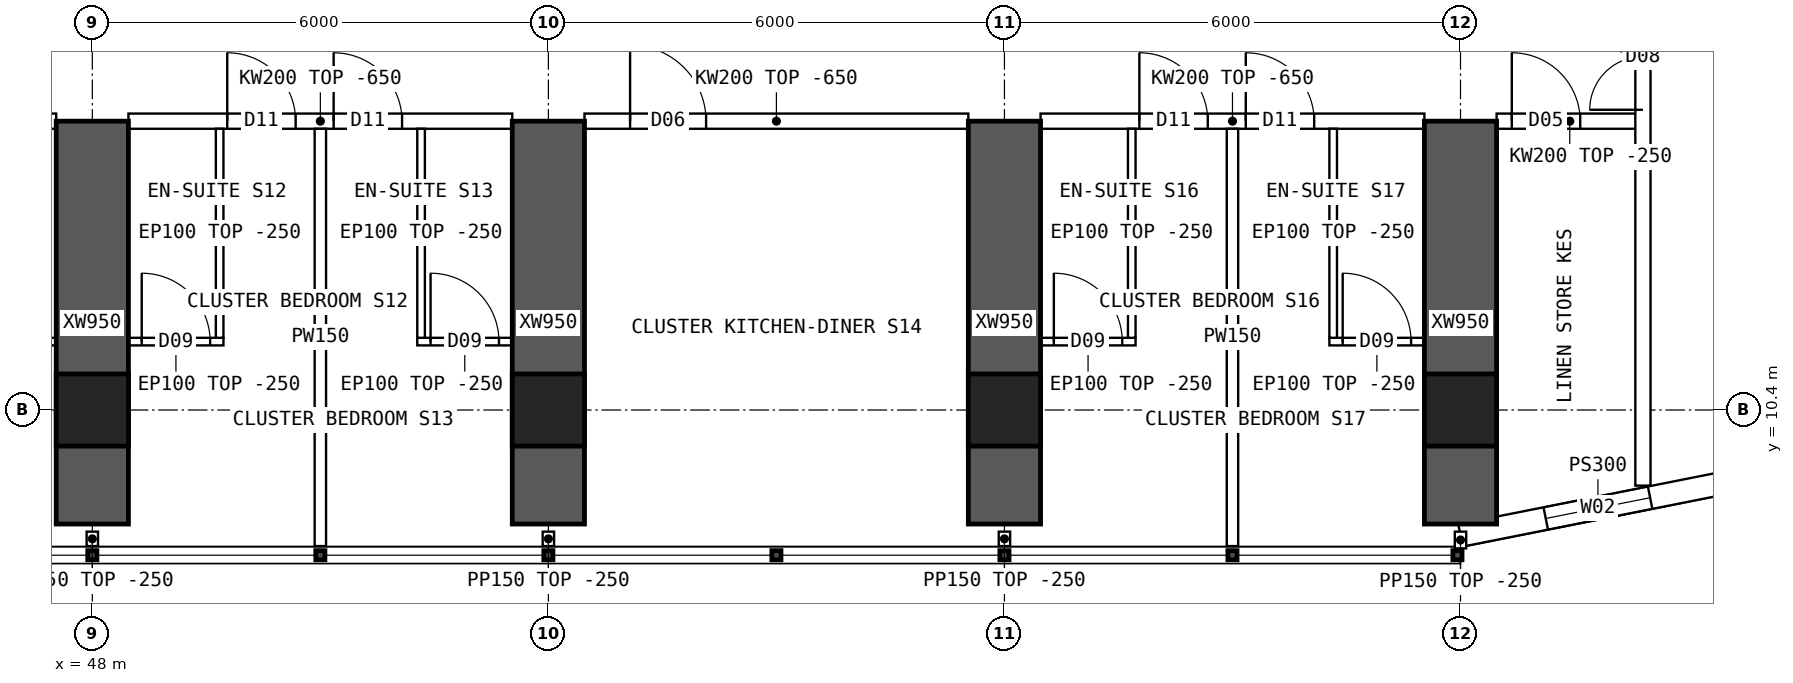
"""IFC4 building model, lengths in metres.
Left out: names, types, materials, properties, quantities, classifications, styles, units other than length and angle.
Written with IfcOpenShell. Run it as: python <this file> out.ifc"""

import sys

from ifc_helpers import new_model, si_unit, direction, frame, frame_2d, origin, origin_2d, place, context, subcontext, project, spatial, polyline, rectangle, hollow_rectangle, outline, extrude, element, fill, save


model = new_model("IFC4")
c1 = context("Model", 3, precision=1e-05, world=origin(), true_north=direction((0.0, 1.0)))
c2 = subcontext(c1, "Body", "Model", "MODEL_VIEW")
j1 = project(units=[si_unit("LENGTHUNIT", "METRE"), si_unit("PLANEANGLEUNIT", "RADIAN")], contexts=[c1])
p1 = place(None, origin())
s1 = spatial("IfcSite", under=j1, at=p1, CompositionType="ELEMENT")
p2 = place(p1, origin())
s2 = spatial("IfcBuilding", under=s1, at=p2, CompositionType="ELEMENT")
p3 = place(p2, frame((0.0, 0.0, 106.9)))
s3 = spatial("IfcBuildingStorey", under=s2, at=p3, CompositionType="ELEMENT", Elevation=106.9)
for number, where, z_axis, x_axis in (
    (1, (48.0, 10.4, 0.0), (0.0, 0.0, 1.0), (1.0, 0.0, 0.0)),
    (2, (54.0, 10.4, 0.0), (0.0, 0.0, 1.0), (1.0, 0.0, 0.0)),
    (3, (60.0, 10.4, 0.0), (0.0, 0.0, 1.0), (1.0, 0.0, 0.0)),
    (4, (66.0, 10.4, 0.0), (0.0, 0.0, 1.0), (1.0, 0.0, 0.0)),
):
    element("IfcColumn", number, at=place(p3, frame(where, z_axis=z_axis, x_axis=x_axis)), inside=s3, PredefinedType="COLUMN", context=c2, shape_type="SweptSolid", body=[
        extrude(hollow_rectangle(XDim=0.95, YDim=0.95, WallThickness=0.095, at=origin_2d()), origin(), (0.0, 0.0, 1.0), 3.75),
    ])
for number, where, z_axis, x_axis in (
    (5, (48.0, 8.9, 0.0), (0.0, 0.0, 1.0), (0.0, 1.0, 0.0)),
    (6, (54.0, 8.9, 0.0), (0.0, 0.0, 1.0), (0.0, 1.0, 0.0)),
    (7, (60.0, 8.9, 0.0), (0.0, 0.0, 1.0), (0.0, 1.0, 0.0)),
    (8, (66.0, 8.9, 0.0), (0.0, 0.0, 1.0), (0.0, 1.0, 0.0)),
):
    element("IfcWall", number, at=place(p3, frame(where, z_axis=z_axis, x_axis=x_axis)), inside=s3, PredefinedType="SHEAR", context=c2, shape_type="SweptSolid", body=[
        extrude(rectangle(XDim=5.3, YDim=0.95, at=frame_2d((2.65, 0.0))), origin(), (0.0, 0.0, 1.0), 3.75),
    ])
p4 = place(p3, frame((66.0, 8.75, 0.0), z_axis=(0.0, 0.0, 1.0), x_axis=(0.980791473772, 0.195059183267, 0.0)))
e9 = element("IfcWall", 9, at=p4, inside=s3, PredefinedType="SOLIDWALL", context=c2, shape_type="SweptSolid", body=[
    extrude(outline(polyline([(-0.03, -0.15), (3.717, -0.15), (3.657, 0.15), (0.03, 0.15), (-0.03, -0.15)])), origin(), (0.0, 0.0, 1.0), 3.5),
])
p5 = place(p4, frame((1.144, 0.0, 0.9)))
e10 = element("IfcOpeningElement", 10, at=p5, cuts=e9, PredefinedType="OPENING", context=c2, shape_type="SweptSolid", body=[
    extrude(rectangle(XDim=1.4, YDim=1.8, at=frame_2d((0.7, 0.9))), frame((0.0, 0.16, 0.0), z_axis=(0.0, -1.0, 0.0), x_axis=(1.0, 0.0, 0.0)), (0.0, 0.0, 1.0), 0.32),
])
p6 = place(p3, frame((42.475, 14.2, 0.0), z_axis=(0.0, 0.0, 1.0), x_axis=(1.0, 0.0, 0.0)))
e11 = element("IfcWall", 11, at=p6, inside=s3, PredefinedType="SOLIDWALL", context=c2, shape_type="SweptSolid", body=[
    extrude(outline(polyline([(0.0, 0.0), (5.05, 0.0), (5.05, 3.1), (0.0, 3.1), (0.0, 0.0)])), frame((0.0, 0.1, 0.0), z_axis=(0.0, -1.0, 0.0), x_axis=(1.0, 0.0, 0.0)), (0.0, 0.0, 1.0), 0.2),
])
p7 = place(p6, frame((1.3, 0.0, 0.0)))
e12 = element("IfcOpeningElement", 12, at=p7, cuts=e11, PredefinedType="OPENING", context=c2, shape_type="SweptSolid", body=[
    extrude(rectangle(XDim=0.9, YDim=2.1, at=frame_2d((0.45, 1.05))), frame((0.0, 0.11, 0.0), z_axis=(0.0, -1.0, 0.0), x_axis=(1.0, 0.0, 0.0)), (0.0, 0.0, 1.0), 0.22),
])
p8 = place(p6, frame((2.7, 0.0, 0.0)))
e13 = element("IfcOpeningElement", 13, at=p8, cuts=e11, PredefinedType="OPENING", context=c2, shape_type="SweptSolid", body=[
    extrude(rectangle(XDim=0.9, YDim=2.1, at=frame_2d((0.45, 1.05))), frame((0.0, 0.11, 0.0), z_axis=(0.0, -1.0, 0.0), x_axis=(1.0, 0.0, 0.0)), (0.0, 0.0, 1.0), 0.22),
])
p9 = place(p3, frame((48.475, 14.2, 0.0), z_axis=(0.0, 0.0, 1.0), x_axis=(1.0, 0.0, 0.0)))
e14 = element("IfcWall", 14, at=p9, inside=s3, PredefinedType="SOLIDWALL", context=c2, shape_type="SweptSolid", body=[
    extrude(outline(polyline([(0.0, 0.0), (5.05, 0.0), (5.05, 3.1), (0.0, 3.1), (0.0, 0.0)])), frame((0.0, 0.1, 0.0), z_axis=(0.0, -1.0, 0.0), x_axis=(1.0, 0.0, 0.0)), (0.0, 0.0, 1.0), 0.2),
])
p10 = place(p9, frame((1.3, 0.0, 0.0)))
e15 = element("IfcOpeningElement", 15, at=p10, cuts=e14, PredefinedType="OPENING", context=c2, shape_type="SweptSolid", body=[
    extrude(rectangle(XDim=0.9, YDim=2.1, at=frame_2d((0.45, 1.05))), frame((0.0, 0.11, 0.0), z_axis=(0.0, -1.0, 0.0), x_axis=(1.0, 0.0, 0.0)), (0.0, 0.0, 1.0), 0.22),
])
p11 = place(p9, frame((2.7, 0.0, 0.0)))
e16 = element("IfcOpeningElement", 16, at=p11, cuts=e14, PredefinedType="OPENING", context=c2, shape_type="SweptSolid", body=[
    extrude(rectangle(XDim=0.9, YDim=2.1, at=frame_2d((0.45, 1.05))), frame((0.0, 0.11, 0.0), z_axis=(0.0, -1.0, 0.0), x_axis=(1.0, 0.0, 0.0)), (0.0, 0.0, 1.0), 0.22),
])
p12 = place(p3, frame((54.475, 14.2, 0.0), z_axis=(0.0, 0.0, 1.0), x_axis=(1.0, 0.0, 0.0)))
e17 = element("IfcWall", 17, at=p12, inside=s3, PredefinedType="SOLIDWALL", context=c2, shape_type="SweptSolid", body=[
    extrude(outline(polyline([(0.0, 0.0), (5.05, 0.0), (5.05, 3.1), (0.0, 3.1), (0.0, 0.0)])), frame((0.0, 0.1, 0.0), z_axis=(0.0, -1.0, 0.0), x_axis=(1.0, 0.0, 0.0)), (0.0, 0.0, 1.0), 0.2),
])
p13 = place(p12, frame((0.6, 0.0, 0.0)))
e18 = element("IfcOpeningElement", 18, at=p13, cuts=e17, PredefinedType="OPENING", context=c2, shape_type="SweptSolid", body=[
    extrude(rectangle(XDim=1.0, YDim=2.1, at=frame_2d((0.5, 1.05))), frame((0.0, 0.11, 0.0), z_axis=(0.0, -1.0, 0.0), x_axis=(1.0, 0.0, 0.0)), (0.0, 0.0, 1.0), 0.22),
])
p14 = place(p3, frame((60.475, 14.2, 0.0), z_axis=(0.0, 0.0, 1.0), x_axis=(1.0, 0.0, 0.0)))
e19 = element("IfcWall", 19, at=p14, inside=s3, PredefinedType="SOLIDWALL", context=c2, shape_type="SweptSolid", body=[
    extrude(outline(polyline([(0.0, 0.0), (5.05, 0.0), (5.05, 3.1), (0.0, 3.1), (0.0, 0.0)])), frame((0.0, 0.1, 0.0), z_axis=(0.0, -1.0, 0.0), x_axis=(1.0, 0.0, 0.0)), (0.0, 0.0, 1.0), 0.2),
])
p15 = place(p14, frame((1.3, 0.0, 0.0)))
e20 = element("IfcOpeningElement", 20, at=p15, cuts=e19, PredefinedType="OPENING", context=c2, shape_type="SweptSolid", body=[
    extrude(rectangle(XDim=0.9, YDim=2.1, at=frame_2d((0.45, 1.05))), frame((0.0, 0.11, 0.0), z_axis=(0.0, -1.0, 0.0), x_axis=(1.0, 0.0, 0.0)), (0.0, 0.0, 1.0), 0.22),
])
p16 = place(p14, frame((2.7, 0.0, 0.0)))
e21 = element("IfcOpeningElement", 21, at=p16, cuts=e19, PredefinedType="OPENING", context=c2, shape_type="SweptSolid", body=[
    extrude(rectangle(XDim=0.9, YDim=2.1, at=frame_2d((0.45, 1.05))), frame((0.0, 0.11, 0.0), z_axis=(0.0, -1.0, 0.0), x_axis=(1.0, 0.0, 0.0)), (0.0, 0.0, 1.0), 0.22),
])
p17 = place(p3, frame((66.475, 14.2, 0.0), z_axis=(0.0, 0.0, 1.0), x_axis=(1.0, 0.0, 0.0)))
e22 = element("IfcWall", 22, at=p17, inside=s3, PredefinedType="SOLIDWALL", context=c2, shape_type="SweptSolid", body=[
    extrude(rectangle(XDim=1.925, YDim=0.2, at=frame_2d((0.962, 0.0))), origin(), (0.0, 0.0, 1.0), 3.5),
])
p18 = place(p17, frame((0.2, 0.0, 0.0)))
e23 = element("IfcOpeningElement", 23, at=p18, cuts=e22, PredefinedType="OPENING", context=c2, shape_type="SweptSolid", body=[
    extrude(rectangle(XDim=0.9, YDim=2.1, at=frame_2d((0.45, 1.05))), frame((0.0, 0.11, 0.0), z_axis=(0.0, -1.0, 0.0), x_axis=(1.0, 0.0, 0.0)), (0.0, 0.0, 1.0), 0.22),
])
p19 = place(p3, frame((47.525, 11.3, 0.0), z_axis=(0.0, 0.0, 1.0), x_axis=(-1.0, 0.0, 0.0)))
e24 = element("IfcWall", 24, at=p19, inside=s3, PredefinedType="PARTITIONING", context=c2, shape_type="SweptSolid", body=[
    extrude(rectangle(XDim=1.25, YDim=0.1, at=frame_2d((0.625, 0.0))), origin(), (0.0, 0.0, 1.0), 3.5),
])
p20 = place(p19, frame((0.175, 0.0, 0.0)))
e25 = element("IfcOpeningElement", 25, at=p20, cuts=e24, PredefinedType="OPENING", context=c2, shape_type="SweptSolid", body=[
    extrude(rectangle(XDim=0.9, YDim=2.1, at=frame_2d((0.45, 1.05))), frame((0.0, 0.06, 0.0), z_axis=(0.0, -1.0, 0.0), x_axis=(1.0, 0.0, 0.0)), (0.0, 0.0, 1.0), 0.12),
])
p21 = place(p3, frame((51.0, 8.61, 0.0), z_axis=(0.0, 0.0, 1.0), x_axis=(0.0, 1.0, 0.0)))
e26 = element("IfcWall", 26, at=p21, inside=s3, PredefinedType="PARTITIONING", context=c2, shape_type="SweptSolid", body=[
    extrude(outline(polyline([(0.0, 0.0), (5.49, 0.0), (5.49, 3.1), (5.442, 3.1), (5.44, 3.5), (1.992, 3.5), (1.99, 3.1), (1.592, 3.1), (1.59, 3.5), (0.0, 3.5), (0.0, 0.0)])), frame((0.0, 0.075, 0.0), z_axis=(0.0, -1.0, 0.0), x_axis=(1.0, 0.0, 0.0)), (0.0, 0.0, 1.0), 0.15),
])
p22 = place(p3, frame((49.725, 11.3, 0.0), z_axis=(0.0, 0.0, 1.0), x_axis=(-1.0, 0.0, 0.0)))
e27 = element("IfcWall", 27, at=p22, inside=s3, PredefinedType="PARTITIONING", context=c2, shape_type="SweptSolid", body=[
    extrude(rectangle(XDim=1.25, YDim=0.1, at=frame_2d((0.625, 0.0))), origin(), (0.0, 0.0, 1.0), 3.5),
])
p23 = place(p22, frame((0.175, 0.0, 0.0)))
e28 = element("IfcOpeningElement", 28, at=p23, cuts=e27, PredefinedType="OPENING", context=c2, shape_type="SweptSolid", body=[
    extrude(rectangle(XDim=0.9, YDim=2.1, at=frame_2d((0.45, 1.05))), frame((0.0, 0.06, 0.0), z_axis=(0.0, -1.0, 0.0), x_axis=(1.0, 0.0, 0.0)), (0.0, 0.0, 1.0), 0.12),
])
p24 = place(p3, frame((49.675, 11.35, 0.0), z_axis=(0.0, 0.0, 1.0), x_axis=(0.0, 1.0, 0.0)))
e29 = element("IfcWall", 29, at=p24, inside=s3, PredefinedType="PARTITIONING", context=c2, shape_type="SweptSolid", body=[
    extrude(outline(polyline([(0.0, 0.0), (2.75, 0.0), (2.75, 3.1), (2.702, 3.1), (2.7, 3.5), (0.0, 3.5), (0.0, 0.0)])), frame((0.0, 0.05, 0.0), z_axis=(0.0, -1.0, 0.0), x_axis=(1.0, 0.0, 0.0)), (0.0, 0.0, 1.0), 0.1),
])
p25 = place(p3, frame((53.525, 11.3, 0.0), z_axis=(0.0, 0.0, 1.0), x_axis=(-1.0, 0.0, 0.0)))
e30 = element("IfcWall", 30, at=p25, inside=s3, PredefinedType="PARTITIONING", context=c2, shape_type="SweptSolid", body=[
    extrude(rectangle(XDim=1.25, YDim=0.1, at=frame_2d((0.625, 0.0))), origin(), (0.0, 0.0, 1.0), 3.5),
])
p26 = place(p25, frame((0.175, 0.0, 0.0)))
e31 = element("IfcOpeningElement", 31, at=p26, cuts=e30, PredefinedType="OPENING", context=c2, shape_type="SweptSolid", body=[
    extrude(rectangle(XDim=0.9, YDim=2.1, at=frame_2d((0.45, 1.05))), frame((0.0, 0.06, 0.0), z_axis=(0.0, -1.0, 0.0), x_axis=(1.0, 0.0, 0.0)), (0.0, 0.0, 1.0), 0.12),
])
p27 = place(p3, frame((52.325, 11.35, 0.0), z_axis=(0.0, 0.0, 1.0), x_axis=(0.0, 1.0, 0.0)))
e32 = element("IfcWall", 32, at=p27, inside=s3, PredefinedType="PARTITIONING", context=c2, shape_type="SweptSolid", body=[
    extrude(outline(polyline([(0.0, 0.0), (2.75, 0.0), (2.75, 3.1), (2.702, 3.1), (2.7, 3.5), (0.0, 3.5), (0.0, 0.0)])), frame((0.0, 0.05, 0.0), z_axis=(0.0, -1.0, 0.0), x_axis=(1.0, 0.0, 0.0)), (0.0, 0.0, 1.0), 0.1),
])
p28 = place(p3, frame((63.0, 8.61, 0.0), z_axis=(0.0, 0.0, 1.0), x_axis=(0.0, 1.0, 0.0)))
e33 = element("IfcWall", 33, at=p28, inside=s3, PredefinedType="PARTITIONING", context=c2, shape_type="SweptSolid", body=[
    extrude(outline(polyline([(0.0, 0.0), (5.49, 0.0), (5.49, 3.1), (5.442, 3.1), (5.44, 3.5), (1.992, 3.5), (1.99, 3.1), (1.592, 3.1), (1.59, 3.5), (0.0, 3.5), (0.0, 0.0)])), frame((0.0, 0.075, 0.0), z_axis=(0.0, -1.0, 0.0), x_axis=(1.0, 0.0, 0.0)), (0.0, 0.0, 1.0), 0.15),
])
p29 = place(p3, frame((61.725, 11.3, 0.0), z_axis=(0.0, 0.0, 1.0), x_axis=(-1.0, 0.0, 0.0)))
e34 = element("IfcWall", 34, at=p29, inside=s3, PredefinedType="PARTITIONING", context=c2, shape_type="SweptSolid", body=[
    extrude(rectangle(XDim=1.25, YDim=0.1, at=frame_2d((0.625, 0.0))), origin(), (0.0, 0.0, 1.0), 3.5),
])
p30 = place(p29, frame((0.175, 0.0, 0.0)))
e35 = element("IfcOpeningElement", 35, at=p30, cuts=e34, PredefinedType="OPENING", context=c2, shape_type="SweptSolid", body=[
    extrude(rectangle(XDim=0.9, YDim=2.1, at=frame_2d((0.45, 1.05))), frame((0.0, 0.06, 0.0), z_axis=(0.0, -1.0, 0.0), x_axis=(1.0, 0.0, 0.0)), (0.0, 0.0, 1.0), 0.12),
])
p31 = place(p3, frame((61.675, 11.35, 0.0), z_axis=(0.0, 0.0, 1.0), x_axis=(0.0, 1.0, 0.0)))
e36 = element("IfcWall", 36, at=p31, inside=s3, PredefinedType="PARTITIONING", context=c2, shape_type="SweptSolid", body=[
    extrude(outline(polyline([(0.0, 0.0), (2.75, 0.0), (2.75, 3.1), (2.702, 3.1), (2.7, 3.5), (0.0, 3.5), (0.0, 0.0)])), frame((0.0, 0.05, 0.0), z_axis=(0.0, -1.0, 0.0), x_axis=(1.0, 0.0, 0.0)), (0.0, 0.0, 1.0), 0.1),
])
p32 = place(p3, frame((65.525, 11.3, 0.0), z_axis=(0.0, 0.0, 1.0), x_axis=(-1.0, 0.0, 0.0)))
e37 = element("IfcWall", 37, at=p32, inside=s3, PredefinedType="PARTITIONING", context=c2, shape_type="SweptSolid", body=[
    extrude(rectangle(XDim=1.25, YDim=0.1, at=frame_2d((0.625, 0.0))), origin(), (0.0, 0.0, 1.0), 3.5),
])
p33 = place(p32, frame((0.175, 0.0, 0.0)))
e38 = element("IfcOpeningElement", 38, at=p33, cuts=e37, PredefinedType="OPENING", context=c2, shape_type="SweptSolid", body=[
    extrude(rectangle(XDim=0.9, YDim=2.1, at=frame_2d((0.45, 1.05))), frame((0.0, 0.06, 0.0), z_axis=(0.0, -1.0, 0.0), x_axis=(1.0, 0.0, 0.0)), (0.0, 0.0, 1.0), 0.12),
])
p34 = place(p3, frame((64.325, 11.35, 0.0), z_axis=(0.0, 0.0, 1.0), x_axis=(0.0, 1.0, 0.0)))
e39 = element("IfcWall", 39, at=p34, inside=s3, PredefinedType="PARTITIONING", context=c2, shape_type="SweptSolid", body=[
    extrude(outline(polyline([(0.0, 0.0), (2.75, 0.0), (2.75, 3.1), (2.702, 3.1), (2.7, 3.5), (0.0, 3.5), (0.0, 0.0)])), frame((0.0, 0.05, 0.0), z_axis=(0.0, -1.0, 0.0), x_axis=(1.0, 0.0, 0.0)), (0.0, 0.0, 1.0), 0.1),
])
p35 = place(p3, frame((68.4, 9.405, 0.0), z_axis=(0.0, 0.0, 1.0), x_axis=(0.0, 1.0, 0.0)))
e40 = element("IfcWall", 40, at=p35, inside=s3, PredefinedType="SOLIDWALL", context=c2, shape_type="SweptSolid", body=[
    extrude(rectangle(XDim=45.189, YDim=0.2, at=frame_2d((22.595, 0.0))), origin(), (0.0, 0.0, 1.0), 3.5),
])
p36 = place(p35, frame((25.595, 0.0, 0.0)))
e41 = element("IfcOpeningElement", 41, at=p36, cuts=e40, PredefinedType="OPENING", context=c2, shape_type="SweptSolid", body=[
    extrude(rectangle(XDim=1.2, YDim=2.1, at=frame_2d((0.6, 1.05))), frame((0.0, 0.11, 0.0), z_axis=(0.0, -1.0, 0.0), x_axis=(1.0, 0.0, 0.0)), (0.0, 0.0, 1.0), 0.22),
])
p37 = place(p35, frame((4.945, 0.0, 0.0)))
e42 = element("IfcOpeningElement", 42, at=p37, cuts=e40, PredefinedType="OPENING", context=c2, shape_type="SweptSolid", body=[
    extrude(rectangle(XDim=1.4, YDim=2.1, at=frame_2d((0.7, 1.05))), frame((0.0, 0.11, 0.0), z_axis=(0.0, -1.0, 0.0), x_axis=(1.0, 0.0, 0.0)), (0.0, 0.0, 1.0), 0.22),
])
p38 = place(p35, frame((38.745, 0.0, 0.0)))
e43 = element("IfcOpeningElement", 43, at=p38, cuts=e40, PredefinedType="OPENING", context=c2, shape_type="SweptSolid", body=[
    extrude(rectangle(XDim=1.4, YDim=2.1, at=frame_2d((0.7, 1.05))), frame((0.0, 0.11, 0.0), z_axis=(0.0, -1.0, 0.0), x_axis=(1.0, 0.0, 0.0)), (0.0, 0.0, 1.0), 0.22),
])
for number, where, z_axis, x_axis in (
    (44, (48.0, 8.8, 0.0), (0.0, 0.0, 1.0), (0.0, -1.0, 0.0)),
    (45, (54.0, 8.8, 0.0), (0.0, 0.0, 1.0), (0.0, -1.0, 0.0)),
    (46, (60.0, 8.8, 0.0), (0.0, 0.0, 1.0), (0.0, -1.0, 0.0)),
):
    element("IfcWall", number, at=place(p3, frame(where, z_axis=z_axis, x_axis=x_axis)), inside=s3, PredefinedType="PARTITIONING", context=c2, shape_type="SweptSolid", body=[
        extrude(rectangle(XDim=0.19, YDim=0.15, at=frame_2d((0.095, 0.0))), origin(), (0.0, 0.0, 1.0), 3.5),
    ])
p39 = place(p3, frame((66.0, 8.8, 0.0), z_axis=(0.0, 0.0, 1.0), x_axis=(0.0, -1.0, 0.0)))
e47 = element("IfcWall", 47, at=p39, inside=s3, PredefinedType="PARTITIONING", context=c2, shape_type="SweptSolid", body=[
    extrude(rectangle(XDim=0.22, YDim=0.15, at=frame_2d((0.11, 0.0))), origin(), (0.0, 0.0, 1.0), 3.5),
])
p40 = place(p5, origin())
e48 = element("IfcWindow", 48, at=p40, inside=s3, PartitioningType="SINGLE_PANEL", PredefinedType="WINDOW", context=c2, shape_type="SweptSolid", body=[
    extrude(rectangle(XDim=1.4, YDim=1.8, at=frame_2d((0.7, 0.9))), frame((0.0, 0.03, 0.0), z_axis=(0.0, -1.0, 0.0), x_axis=(1.0, 0.0, 0.0)), (0.0, 0.0, 1.0), 0.06),
])
fill(e10, e48)
p41 = place(p23, origin())
e49 = element("IfcDoor", 49, at=p41, inside=s3, OperationType="SINGLE_SWING_RIGHT", PredefinedType="DOOR", context=c2, shape_type="SweptSolid", body=[
    extrude(rectangle(XDim=0.9, YDim=2.1, at=frame_2d((0.45, 1.05))), frame((0.0, 0.025, 0.0), z_axis=(0.0, -1.0, 0.0), x_axis=(1.0, 0.0, 0.0)), (0.0, 0.0, 1.0), 0.05),
])
fill(e28, e49)
p42 = place(p10, origin())
e50 = element("IfcDoor", 50, at=p42, inside=s3, OperationType="SINGLE_SWING_LEFT", PredefinedType="DOOR", context=c2, shape_type="SweptSolid", body=[
    extrude(rectangle(XDim=0.9, YDim=2.1, at=frame_2d((0.45, 1.05))), frame((0.0, 0.025, 0.0), z_axis=(0.0, -1.0, 0.0), x_axis=(1.0, 0.0, 0.0)), (0.0, 0.0, 1.0), 0.05),
])
fill(e15, e50)
p43 = place(p26, origin())
e51 = element("IfcDoor", 51, at=p43, inside=s3, OperationType="SINGLE_SWING_RIGHT", PredefinedType="DOOR", context=c2, shape_type="SweptSolid", body=[
    extrude(rectangle(XDim=0.9, YDim=2.1, at=frame_2d((0.45, 1.05))), frame((0.0, 0.025, 0.0), z_axis=(0.0, -1.0, 0.0), x_axis=(1.0, 0.0, 0.0)), (0.0, 0.0, 1.0), 0.05),
])
fill(e31, e51)
p44 = place(p11, origin())
e52 = element("IfcDoor", 52, at=p44, inside=s3, OperationType="SINGLE_SWING_LEFT", PredefinedType="DOOR", context=c2, shape_type="SweptSolid", body=[
    extrude(rectangle(XDim=0.9, YDim=2.1, at=frame_2d((0.45, 1.05))), frame((0.0, 0.025, 0.0), z_axis=(0.0, -1.0, 0.0), x_axis=(1.0, 0.0, 0.0)), (0.0, 0.0, 1.0), 0.05),
])
fill(e16, e52)
p45 = place(p13, origin())
e53 = element("IfcDoor", 53, at=p45, inside=s3, OperationType="SINGLE_SWING_LEFT", PredefinedType="DOOR", context=c2, shape_type="SweptSolid", body=[
    extrude(rectangle(XDim=1.0, YDim=2.1, at=frame_2d((0.5, 1.05))), frame((0.0, 0.025, 0.0), z_axis=(0.0, -1.0, 0.0), x_axis=(1.0, 0.0, 0.0)), (0.0, 0.0, 1.0), 0.05),
])
fill(e18, e53)
p46 = place(p30, origin())
e54 = element("IfcDoor", 54, at=p46, inside=s3, OperationType="SINGLE_SWING_RIGHT", PredefinedType="DOOR", context=c2, shape_type="SweptSolid", body=[
    extrude(rectangle(XDim=0.9, YDim=2.1, at=frame_2d((0.45, 1.05))), frame((0.0, 0.025, 0.0), z_axis=(0.0, -1.0, 0.0), x_axis=(1.0, 0.0, 0.0)), (0.0, 0.0, 1.0), 0.05),
])
fill(e35, e54)
p47 = place(p15, origin())
e55 = element("IfcDoor", 55, at=p47, inside=s3, OperationType="SINGLE_SWING_LEFT", PredefinedType="DOOR", context=c2, shape_type="SweptSolid", body=[
    extrude(rectangle(XDim=0.9, YDim=2.1, at=frame_2d((0.45, 1.05))), frame((0.0, 0.025, 0.0), z_axis=(0.0, -1.0, 0.0), x_axis=(1.0, 0.0, 0.0)), (0.0, 0.0, 1.0), 0.05),
])
fill(e20, e55)
p48 = place(p33, origin())
e56 = element("IfcDoor", 56, at=p48, inside=s3, OperationType="SINGLE_SWING_RIGHT", PredefinedType="DOOR", context=c2, shape_type="SweptSolid", body=[
    extrude(rectangle(XDim=0.9, YDim=2.1, at=frame_2d((0.45, 1.05))), frame((0.0, 0.025, 0.0), z_axis=(0.0, -1.0, 0.0), x_axis=(1.0, 0.0, 0.0)), (0.0, 0.0, 1.0), 0.05),
])
fill(e38, e56)
p49 = place(p16, origin())
e57 = element("IfcDoor", 57, at=p49, inside=s3, OperationType="SINGLE_SWING_LEFT", PredefinedType="DOOR", context=c2, shape_type="SweptSolid", body=[
    extrude(rectangle(XDim=0.9, YDim=2.1, at=frame_2d((0.45, 1.05))), frame((0.0, 0.025, 0.0), z_axis=(0.0, -1.0, 0.0), x_axis=(1.0, 0.0, 0.0)), (0.0, 0.0, 1.0), 0.05),
])
fill(e21, e57)
p50 = place(p37, origin())
e58 = element("IfcDoor", 58, at=p50, inside=s3, OperationType="DOUBLE_DOOR_SINGLE_SWING", PredefinedType="DOOR", context=c2, shape_type="SweptSolid", body=[
    extrude(rectangle(XDim=1.4, YDim=2.1, at=frame_2d((0.7, 1.05))), frame((0.0, 0.025, 0.0), z_axis=(0.0, -1.0, 0.0), x_axis=(1.0, 0.0, 0.0)), (0.0, 0.0, 1.0), 0.05),
])
fill(e42, e58)
p51 = place(p18, origin())
e59 = element("IfcDoor", 59, at=p51, inside=s3, OperationType="SINGLE_SWING_LEFT", PredefinedType="DOOR", context=c2, shape_type="SweptSolid", body=[
    extrude(rectangle(XDim=0.9, YDim=2.1, at=frame_2d((0.45, 1.05))), frame((0.0, 0.025, 0.0), z_axis=(0.0, -1.0, 0.0), x_axis=(1.0, 0.0, 0.0)), (0.0, 0.0, 1.0), 0.05),
])
fill(e23, e59)
save(model, sys.argv[1])
